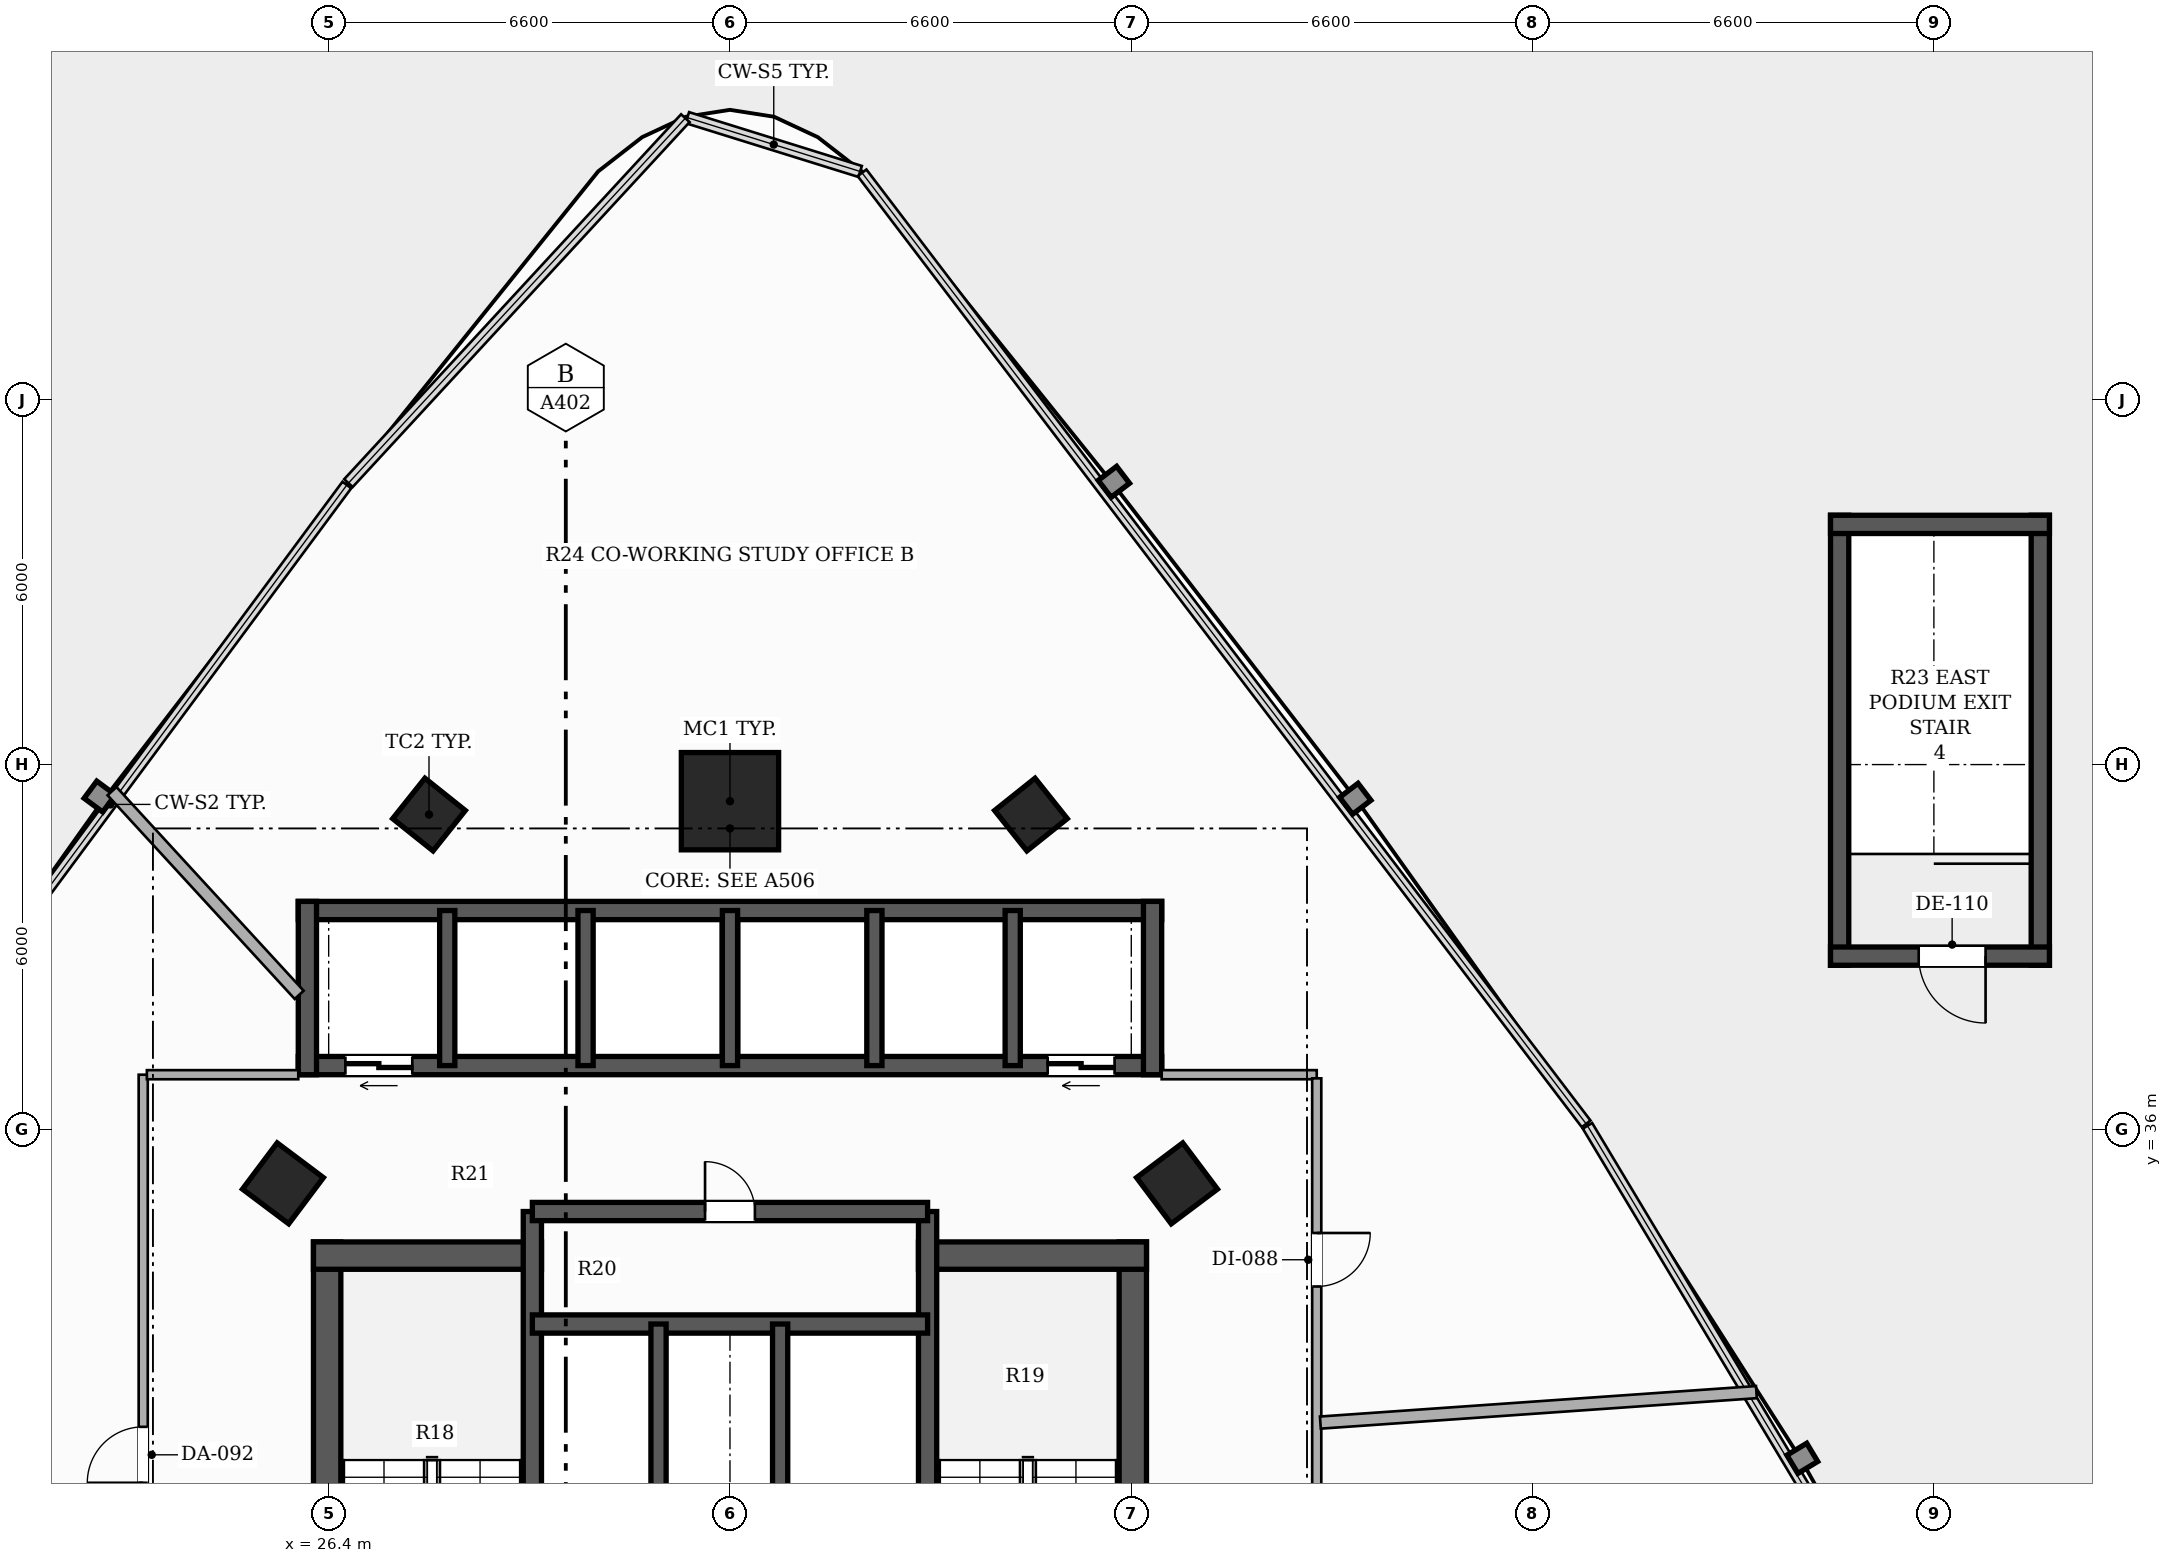
"""IFC4 building model, lengths in metres.
Left out: names, types, materials, properties, quantities, classifications, styles, units other than length and angle.
Written with IfcOpenShell. Run it as: python <this file> out.ifc"""

import sys

from ifc_helpers import new_model, si_unit, direction, frame, frame_2d, origin, origin_2d, place, context, subcontext, project, spatial, rectangle, hollow_rectangle, extrude, element, fill, save


model = new_model("IFC4")
c1 = context("Model", 3, precision=1e-05, world=origin(), true_north=direction((0.0, 1.0)))
c2 = subcontext(c1, "Body", "Model", "MODEL_VIEW")
j1 = project(units=[si_unit("LENGTHUNIT", "METRE"), si_unit("PLANEANGLEUNIT", "RADIAN")], contexts=[c1])
p1 = place(None, origin())
s1 = spatial("IfcSite", under=j1, at=p1, CompositionType="ELEMENT")
p2 = place(p1, origin())
s2 = spatial("IfcBuilding", under=s1, at=p2, CompositionType="ELEMENT")
p3 = place(p2, frame((0.0, 0.0, 23.6)))
s3 = spatial("IfcBuildingStorey", under=s2, at=p3, CompositionType="ELEMENT", Elevation=23.6)
p4 = place(p3, frame((26.375, 26.45, 0.0), z_axis=(0.0, 0.0, 1.0), x_axis=(0.0, 1.0, 0.0)))
e1 = element("IfcWall", 1, at=p4, inside=s3, PredefinedType="SHEAR", context=c2, shape_type="SweptSolid", body=[
    extrude(rectangle(XDim=7.7, YDim=0.45, at=frame_2d((3.85, 0.0))), origin(), (0.0, 0.0, 1.0), 3.3),
])
p5 = place(p3, frame((26.15, 33.925, 0.0), z_axis=(0.0, 0.0, 1.0), x_axis=(1.0, 0.0, 0.0)))
e2 = element("IfcWall", 2, at=p5, inside=s3, PredefinedType="SHEAR", context=c2, shape_type="SweptSolid", body=[
    extrude(rectangle(XDim=3.75, YDim=0.45, at=frame_2d((1.875, 0.0))), origin(), (0.0, 0.0, 1.0), 3.3),
])
p6 = place(p3, frame((39.625, 26.45, 0.0), z_axis=(0.0, 0.0, 1.0), x_axis=(0.0, 1.0, 0.0)))
e3 = element("IfcWall", 3, at=p6, inside=s3, PredefinedType="SHEAR", context=c2, shape_type="SweptSolid", body=[
    extrude(rectangle(XDim=7.7, YDim=0.45, at=frame_2d((3.85, 0.0))), origin(), (0.0, 0.0, 1.0), 3.3),
])
p7 = place(p3, frame((36.1, 33.925, 0.0), z_axis=(0.0, 0.0, 1.0), x_axis=(1.0, 0.0, 0.0)))
e4 = element("IfcWall", 4, at=p7, inside=s3, PredefinedType="SHEAR", context=c2, shape_type="SweptSolid", body=[
    extrude(rectangle(XDim=3.75, YDim=0.45, at=frame_2d((1.875, 0.0))), origin(), (0.0, 0.0, 1.0), 3.3),
])
p8 = place(p3, frame((29.75, 26.45, 0.0), z_axis=(0.0, 0.0, 1.0), x_axis=(0.0, 1.0, 0.0)))
e5 = element("IfcWall", 5, at=p8, inside=s3, PredefinedType="SHEAR", context=c2, shape_type="SweptSolid", body=[
    extrude(rectangle(XDim=8.2, YDim=0.3, at=frame_2d((4.1, 0.0))), origin(), (0.0, 0.0, 1.0), 3.3),
])
p9 = place(p8, frame((0.6, 0.0, 0.0)))
e6 = element("IfcOpeningElement", 6, at=p9, cuts=e5, PredefinedType="OPENING", context=c2, shape_type="SweptSolid", body=[
    extrude(rectangle(XDim=1.05, YDim=2.15, at=frame_2d((0.525, 1.075))), frame((0.0, 0.16, 0.0), z_axis=(0.0, -1.0, 0.0), x_axis=(1.0, 0.0, 0.0)), (0.0, 0.0, 1.0), 0.32),
])
p10 = place(p3, frame((36.25, 26.45, 0.0), z_axis=(0.0, 0.0, 1.0), x_axis=(0.0, 1.0, 0.0)))
e7 = element("IfcWall", 7, at=p10, inside=s3, PredefinedType="SHEAR", context=c2, shape_type="SweptSolid", body=[
    extrude(rectangle(XDim=8.2, YDim=0.3, at=frame_2d((4.1, 0.0))), origin(), (0.0, 0.0, 1.0), 3.3),
])
p11 = place(p10, frame((0.6, 0.0, 0.0)))
e8 = element("IfcOpeningElement", 8, at=p11, cuts=e7, PredefinedType="OPENING", context=c2, shape_type="SweptSolid", body=[
    extrude(rectangle(XDim=1.05, YDim=2.15, at=frame_2d((0.525, 1.075))), frame((0.0, 0.16, 0.0), z_axis=(0.0, -1.0, 0.0), x_axis=(1.0, 0.0, 0.0)), (0.0, 0.0, 1.0), 0.32),
])
p12 = place(p3, frame((29.75, 32.8, 0.0), z_axis=(0.0, 0.0, 1.0), x_axis=(1.0, 0.0, 0.0)))
e9 = element("IfcWall", 9, at=p12, inside=s3, PredefinedType="SHEAR", context=c2, shape_type="SweptSolid", body=[
    extrude(rectangle(XDim=6.5, YDim=0.3, at=frame_2d((3.25, 0.0))), origin(), (0.0, 0.0, 1.0), 3.3),
])
for number, where, z_axis, x_axis in (
    (10, (31.825, 29.9, 0.0), (0.0, 0.0, 1.0), (0.0, 1.0, 0.0)),
    (11, (33.825, 29.9, 0.0), (0.0, 0.0, 1.0), (0.0, 1.0, 0.0)),
):
    element("IfcWall", number, at=place(p3, frame(where, z_axis=z_axis, x_axis=x_axis)), inside=s3, PredefinedType="SHEAR", context=c2, shape_type="SweptSolid", body=[
        extrude(rectangle(XDim=2.9, YDim=0.25, at=frame_2d((1.45, 0.0))), origin(), (0.0, 0.0, 1.0), 3.3),
    ])
p13 = place(p3, frame((29.75, 34.65, 0.0), z_axis=(0.0, 0.0, 1.0), x_axis=(1.0, 0.0, 0.0)))
e12 = element("IfcWall", 12, at=p13, inside=s3, PredefinedType="SHEAR", context=c2, shape_type="SweptSolid", body=[
    extrude(rectangle(XDim=6.5, YDim=0.3, at=frame_2d((3.25, 0.0))), origin(), (0.0, 0.0, 1.0), 3.3),
])
p14 = place(p13, frame((2.84, 0.0, 0.0)))
e13 = element("IfcOpeningElement", 13, at=p14, cuts=e12, PredefinedType="OPENING", context=c2, shape_type="SweptSolid", body=[
    extrude(rectangle(XDim=0.82, YDim=2.1, at=frame_2d((0.41, 1.05))), frame((0.0, 0.16, 0.0), z_axis=(0.0, -1.0, 0.0), x_axis=(1.0, 0.0, 0.0)), (0.0, 0.0, 1.0), 0.32),
])
p15 = place(p3, frame((40.1, 37.05, 0.0), z_axis=(0.0, 0.0, 1.0), x_axis=(-1.0, 0.0, 0.0)))
e14 = element("IfcWall", 14, at=p15, inside=s3, PredefinedType="SHEAR", context=c2, shape_type="SweptSolid", body=[
    extrude(rectangle(XDim=14.2, YDim=0.3, at=frame_2d((7.1, 0.0))), origin(), (0.0, 0.0, 1.0), 3.3),
])
p16 = place(p15, frame((12.325, 0.0, 0.0)))
e15 = element("IfcOpeningElement", 15, at=p16, cuts=e14, PredefinedType="OPENING", context=c2, shape_type="SweptSolid", body=[
    extrude(rectangle(XDim=1.1, YDim=2.2, at=frame_2d((0.55, 1.1))), frame((0.0, 0.16, 0.0), z_axis=(0.0, -1.0, 0.0), x_axis=(1.0, 0.0, 0.0)), (0.0, 0.0, 1.0), 0.32),
])
p17 = place(p15, frame((0.775, 0.0, 0.0)))
e16 = element("IfcOpeningElement", 16, at=p17, cuts=e14, PredefinedType="OPENING", context=c2, shape_type="SweptSolid", body=[
    extrude(rectangle(XDim=1.1, YDim=2.2, at=frame_2d((0.55, 1.1))), frame((0.0, 0.16, 0.0), z_axis=(0.0, -1.0, 0.0), x_axis=(1.0, 0.0, 0.0)), (0.0, 0.0, 1.0), 0.32),
])
p18 = place(p3, frame((25.9, 39.6, 0.0), z_axis=(0.0, 0.0, 1.0), x_axis=(1.0, 0.0, 0.0)))
e17 = element("IfcWall", 17, at=p18, inside=s3, PredefinedType="SHEAR", context=c2, shape_type="SweptSolid", body=[
    extrude(rectangle(XDim=14.2, YDim=0.3, at=frame_2d((7.1, 0.0))), origin(), (0.0, 0.0, 1.0), 3.3),
])
for number, where, z_axis, x_axis in (
    (18, (26.05, 36.9, 0.0), (0.0, 0.0, 1.0), (0.0, 1.0, 0.0)),
    (19, (39.95, 36.9, 0.0), (0.0, 0.0, 1.0), (0.0, 1.0, 0.0)),
):
    element("IfcWall", number, at=place(p3, frame(where, z_axis=z_axis, x_axis=x_axis)), inside=s3, PredefinedType="SHEAR", context=c2, shape_type="SweptSolid", body=[
        extrude(rectangle(XDim=2.85, YDim=0.3, at=frame_2d((1.425, 0.0))), origin(), (0.0, 0.0, 1.0), 3.3),
    ])
for number, where, z_axis, x_axis in (
    (20, (28.35, 37.05, 0.0), (0.0, 0.0, 1.0), (0.0, 1.0, 0.0)),
    (21, (30.625, 37.05, 0.0), (0.0, 0.0, 1.0), (0.0, 1.0, 0.0)),
    (22, (33.0, 37.05, 0.0), (0.0, 0.0, 1.0), (0.0, 1.0, 0.0)),
    (23, (35.375, 37.05, 0.0), (0.0, 0.0, 1.0), (0.0, 1.0, 0.0)),
    (24, (37.65, 37.05, 0.0), (0.0, 0.0, 1.0), (0.0, 1.0, 0.0)),
):
    element("IfcWall", number, at=place(p3, frame(where, z_axis=z_axis, x_axis=x_axis)), inside=s3, PredefinedType="SHEAR", context=c2, shape_type="SweptSolid", body=[
        extrude(rectangle(XDim=2.55, YDim=0.25, at=frame_2d((1.275, 0.0))), origin(), (0.0, 0.0, 1.0), 3.3),
    ])
for number, where, z_axis, x_axis in (
    (25, (51.25, 38.7, 0.0), (0.0, 0.0, 1.0), (0.0, 1.0, 0.0)),
    (26, (54.55, 38.7, 0.0), (0.0, 0.0, 1.0), (0.0, 1.0, 0.0)),
):
    element("IfcWall", number, at=place(p3, frame(where, z_axis=z_axis, x_axis=x_axis)), inside=s3, PredefinedType="SHEAR", context=c2, shape_type="SweptSolid", body=[
        extrude(rectangle(XDim=7.4, YDim=0.3, at=frame_2d((3.7, 0.0))), origin(), (0.0, 0.0, 1.0), 3.1),
    ])
p19 = place(p3, frame((51.1, 45.95, 0.0), z_axis=(0.0, 0.0, 1.0), x_axis=(1.0, 0.0, 0.0)))
e27 = element("IfcWall", 27, at=p19, inside=s3, PredefinedType="SHEAR", context=c2, shape_type="SweptSolid", body=[
    extrude(rectangle(XDim=3.6, YDim=0.3, at=frame_2d((1.8, 0.0))), origin(), (0.0, 0.0, 1.0), 3.1),
])
p20 = place(p3, frame((54.7, 38.85, 0.0), z_axis=(0.0, 0.0, 1.0), x_axis=(-1.0, 0.0, 0.0)))
e28 = element("IfcWall", 28, at=p20, inside=s3, PredefinedType="SHEAR", context=c2, shape_type="SweptSolid", body=[
    extrude(rectangle(XDim=3.6, YDim=0.3, at=frame_2d((1.8, 0.0))), origin(), (0.0, 0.0, 1.0), 3.1),
])
p21 = place(p20, frame((1.05, 0.0, 0.0)))
e29 = element("IfcOpeningElement", 29, at=p21, cuts=e28, PredefinedType="OPENING", context=c2, shape_type="SweptSolid", body=[
    extrude(rectangle(XDim=1.1, YDim=2.15, at=frame_2d((0.55, 1.075))), frame((0.0, 0.16, 0.0), z_axis=(0.0, -1.0, 0.0), x_axis=(1.0, 0.0, 0.0)), (0.0, 0.0, 1.0), 0.32),
])
p22 = place(p3, frame((33.0, 41.398, 0.0), z_axis=(0.0, 0.0, 1.0), x_axis=(1.0, 0.0, 0.0)))
e30 = element("IfcColumn", 30, at=p22, inside=s3, PredefinedType="COLUMN", context=c2, shape_type="SweptSolid", body=[
    extrude(hollow_rectangle(XDim=1.6, YDim=1.6, WallThickness=0.05, at=origin_2d()), origin(), (0.0, 0.0, 1.0), 3.3),
])
for number, where, z_axis, x_axis in (
    (31, (25.648, 35.113, 0.0), (0.0, 0.0, 1.0), (0.6, 0.8, 0.0)),
    (32, (40.352, 35.113, 0.0), (0.0, 0.0, 1.0), (-0.6, 0.8, 0.0)),
):
    element("IfcColumn", number, at=place(p3, frame(where, z_axis=z_axis, x_axis=x_axis)), inside=s3, PredefinedType="COLUMN", context=c2, shape_type="SweptSolid", body=[
        extrude(hollow_rectangle(XDim=0.95, YDim=0.95, WallThickness=0.032, at=origin_2d()), origin(), (0.0, 0.0, 1.0), 3.3),
    ])
for number, where, z_axis, x_axis in (
    (33, (28.05, 41.178, 0.0), (0.0, 0.0, 1.0), (0.624, 0.782, 0.0)),
    (34, (37.95, 41.178, 0.0), (0.0, 0.0, 1.0), (-0.624, 0.782, 0.0)),
):
    element("IfcColumn", number, at=place(p3, frame(where, z_axis=z_axis, x_axis=x_axis)), inside=s3, PredefinedType="COLUMN", context=c2, shape_type="SweptSolid", body=[
        extrude(hollow_rectangle(XDim=0.85, YDim=0.85, WallThickness=0.028, at=origin_2d()), origin(), (0.0, 0.0, 1.0), 3.3),
    ])
p23 = place(p3, frame((40.1, 36.9, 0.0), z_axis=(0.0, 0.0, 1.0), x_axis=(1.0, 0.0, 0.0)))
e35 = element("IfcWall", 35, at=p23, inside=s3, PredefinedType="PARTITIONING", context=c2, shape_type="SweptSolid", body=[
    extrude(rectangle(XDim=2.55, YDim=0.15, at=frame_2d((1.275, 0.0))), origin(), (0.0, 0.0, 1.0), 2.413),
])
p24 = place(p3, frame((42.65, 36.84, 0.0), z_axis=(0.0, 0.0, 1.0), x_axis=(0.0, -1.0, 0.0)))
e36 = element("IfcWall", 36, at=p24, inside=s3, PredefinedType="PARTITIONING", context=c2, shape_type="SweptSolid", body=[
    extrude(rectangle(XDim=25.04, YDim=0.15, at=frame_2d((12.52, 0.0))), origin(), (0.0, 0.0, 1.0), 2.413),
])
p25 = place(p24, frame((2.543, 0.0, 0.0)))
e37 = element("IfcOpeningElement", 37, at=p25, cuts=e36, PredefinedType="OPENING", context=c2, shape_type="SweptSolid", body=[
    extrude(rectangle(XDim=0.88, YDim=2.1, at=frame_2d((0.44, 1.05))), frame((0.0, 0.085, 0.0), z_axis=(0.0, -1.0, 0.0), x_axis=(1.0, 0.0, 0.0)), (0.0, 0.0, 1.0), 0.17),
])
p26 = place(p24, frame((15.79, 0.0, 0.0)))
e38 = element("IfcOpeningElement", 38, at=p26, cuts=e36, PredefinedType="OPENING", context=c2, shape_type="SweptSolid", body=[
    extrude(rectangle(XDim=0.92, YDim=2.15, at=frame_2d((0.46, 1.075))), frame((0.0, 0.085, 0.0), z_axis=(0.0, -1.0, 0.0), x_axis=(1.0, 0.0, 0.0)), (0.0, 0.0, 1.0), 0.17),
])
p27 = place(p24, frame((9.123, 0.0, 0.0)))
e39 = element("IfcOpeningElement", 39, at=p27, cuts=e36, PredefinedType="OPENING", context=c2, shape_type="SweptSolid", body=[
    extrude(rectangle(XDim=0.88, YDim=2.1, at=frame_2d((0.44, 1.05))), frame((0.0, 0.085, 0.0), z_axis=(0.0, -1.0, 0.0), x_axis=(1.0, 0.0, 0.0)), (0.0, 0.0, 1.0), 0.17),
])
p28 = place(p3, frame((23.35, 11.86, 0.0), z_axis=(0.0, 0.0, 1.0), x_axis=(0.0, 1.0, 0.0)))
e40 = element("IfcWall", 40, at=p28, inside=s3, PredefinedType="PARTITIONING", context=c2, shape_type="SweptSolid", body=[
    extrude(rectangle(XDim=25.04, YDim=0.15, at=frame_2d((12.52, 0.0))), origin(), (0.0, 0.0, 1.0), 2.413),
])
p29 = place(p28, frame((9.573, 0.0, 0.0)))
e41 = element("IfcOpeningElement", 41, at=p29, cuts=e40, PredefinedType="OPENING", context=c2, shape_type="SweptSolid", body=[
    extrude(rectangle(XDim=0.88, YDim=2.1, at=frame_2d((0.44, 1.05))), frame((0.0, 0.085, 0.0), z_axis=(0.0, -1.0, 0.0), x_axis=(1.0, 0.0, 0.0)), (0.0, 0.0, 1.0), 0.17),
])
p30 = place(p28, frame((18.329, 0.0, 0.0)))
e42 = element("IfcOpeningElement", 42, at=p30, cuts=e40, PredefinedType="OPENING", context=c2, shape_type="SweptSolid", body=[
    extrude(rectangle(XDim=0.92, YDim=2.15, at=frame_2d((0.46, 1.075))), frame((0.0, 0.085, 0.0), z_axis=(0.0, -1.0, 0.0), x_axis=(1.0, 0.0, 0.0)), (0.0, 0.0, 1.0), 0.17),
])
p31 = place(p3, frame((23.41, 36.9, 0.0), z_axis=(0.0, 0.0, 1.0), x_axis=(1.0, 0.0, 0.0)))
e43 = element("IfcWall", 43, at=p31, inside=s3, PredefinedType="PARTITIONING", context=c2, shape_type="SweptSolid", body=[
    extrude(rectangle(XDim=2.49, YDim=0.15, at=frame_2d((1.245, 0.0))), origin(), (0.0, 0.0, 1.0), 2.413),
])
p32 = place(p3, frame((25.915, 38.213, 0.0), z_axis=(0.0, 0.0, 1.0), x_axis=(-0.676584398078, 0.736365094418, 0.0)))
e44 = element("IfcWall", 44, at=p32, inside=s3, PredefinedType="PARTITIONING", context=c2, shape_type="SweptSolid", body=[
    extrude(rectangle(XDim=4.55, YDim=0.2, at=frame_2d((2.275, 0.0))), origin(), (0.0, 0.0, 1.0), 2.619),
])
p33 = place(p3, frame((49.881, 31.68, 0.0), z_axis=(0.0, 0.0, 1.0), x_axis=(-0.997568680722, -0.069690223431, 0.0)))
e45 = element("IfcWall", 45, at=p33, inside=s3, PredefinedType="PARTITIONING", context=c2, shape_type="SweptSolid", body=[
    extrude(rectangle(XDim=7.189, YDim=0.2, at=frame_2d((3.594, 0.0))), origin(), (0.0, 0.0, 1.0), 2.413),
])
p34 = place(p21, origin())
e46 = element("IfcDoor", 46, at=p34, inside=s3, OperationType="SINGLE_SWING_LEFT", PredefinedType="DOOR", context=c2, shape_type="SweptSolid", body=[
    extrude(rectangle(XDim=1.1, YDim=2.15, at=frame_2d((0.55, 1.075))), frame((0.0, 0.025, 0.0), z_axis=(0.0, -1.0, 0.0), x_axis=(1.0, 0.0, 0.0)), (0.0, 0.0, 1.0), 0.05),
])
fill(e29, e46)
p35 = place(p16, origin())
e47 = element("IfcDoor", 47, at=p35, inside=s3, OperationType="DOUBLE_DOOR_SLIDING", PredefinedType="DOOR", context=c2, shape_type="SweptSolid", body=[
    extrude(rectangle(XDim=1.1, YDim=2.2, at=frame_2d((0.55, 1.1))), frame((0.0, 0.025, 0.0), z_axis=(0.0, -1.0, 0.0), x_axis=(1.0, 0.0, 0.0)), (0.0, 0.0, 1.0), 0.05),
])
fill(e15, e47)
p36 = place(p17, origin())
e48 = element("IfcDoor", 48, at=p36, inside=s3, OperationType="DOUBLE_DOOR_SLIDING", PredefinedType="DOOR", context=c2, shape_type="SweptSolid", body=[
    extrude(rectangle(XDim=1.1, YDim=2.2, at=frame_2d((0.55, 1.1))), frame((0.0, 0.025, 0.0), z_axis=(0.0, -1.0, 0.0), x_axis=(1.0, 0.0, 0.0)), (0.0, 0.0, 1.0), 0.05),
])
fill(e16, e48)
p37 = place(p14, origin())
e49 = element("IfcDoor", 49, at=p37, inside=s3, OperationType="SINGLE_SWING_LEFT", PredefinedType="DOOR", context=c2, shape_type="SweptSolid", body=[
    extrude(rectangle(XDim=0.82, YDim=2.1, at=frame_2d((0.41, 1.05))), frame((0.0, 0.025, 0.0), z_axis=(0.0, -1.0, 0.0), x_axis=(1.0, 0.0, 0.0)), (0.0, 0.0, 1.0), 0.05),
])
fill(e13, e49)
p38 = place(p25, origin())
e50 = element("IfcDoor", 50, at=p38, inside=s3, OperationType="SINGLE_SWING_LEFT", PredefinedType="DOOR", context=c2, shape_type="SweptSolid", body=[
    extrude(rectangle(XDim=0.88, YDim=2.1, at=frame_2d((0.44, 1.05))), frame((0.0, 0.025, 0.0), z_axis=(0.0, -1.0, 0.0), x_axis=(1.0, 0.0, 0.0)), (0.0, 0.0, 1.0), 0.05),
])
fill(e37, e50)
p39 = place(p30, origin())
e51 = element("IfcDoor", 51, at=p39, inside=s3, OperationType="SINGLE_SWING_LEFT", PredefinedType="DOOR", context=c2, shape_type="SweptSolid", body=[
    extrude(rectangle(XDim=0.92, YDim=2.15, at=frame_2d((0.46, 1.075))), frame((0.0, 0.025, 0.0), z_axis=(0.0, -1.0, 0.0), x_axis=(1.0, 0.0, 0.0)), (0.0, 0.0, 1.0), 0.05),
])
fill(e42, e51)
save(model, sys.argv[1])
